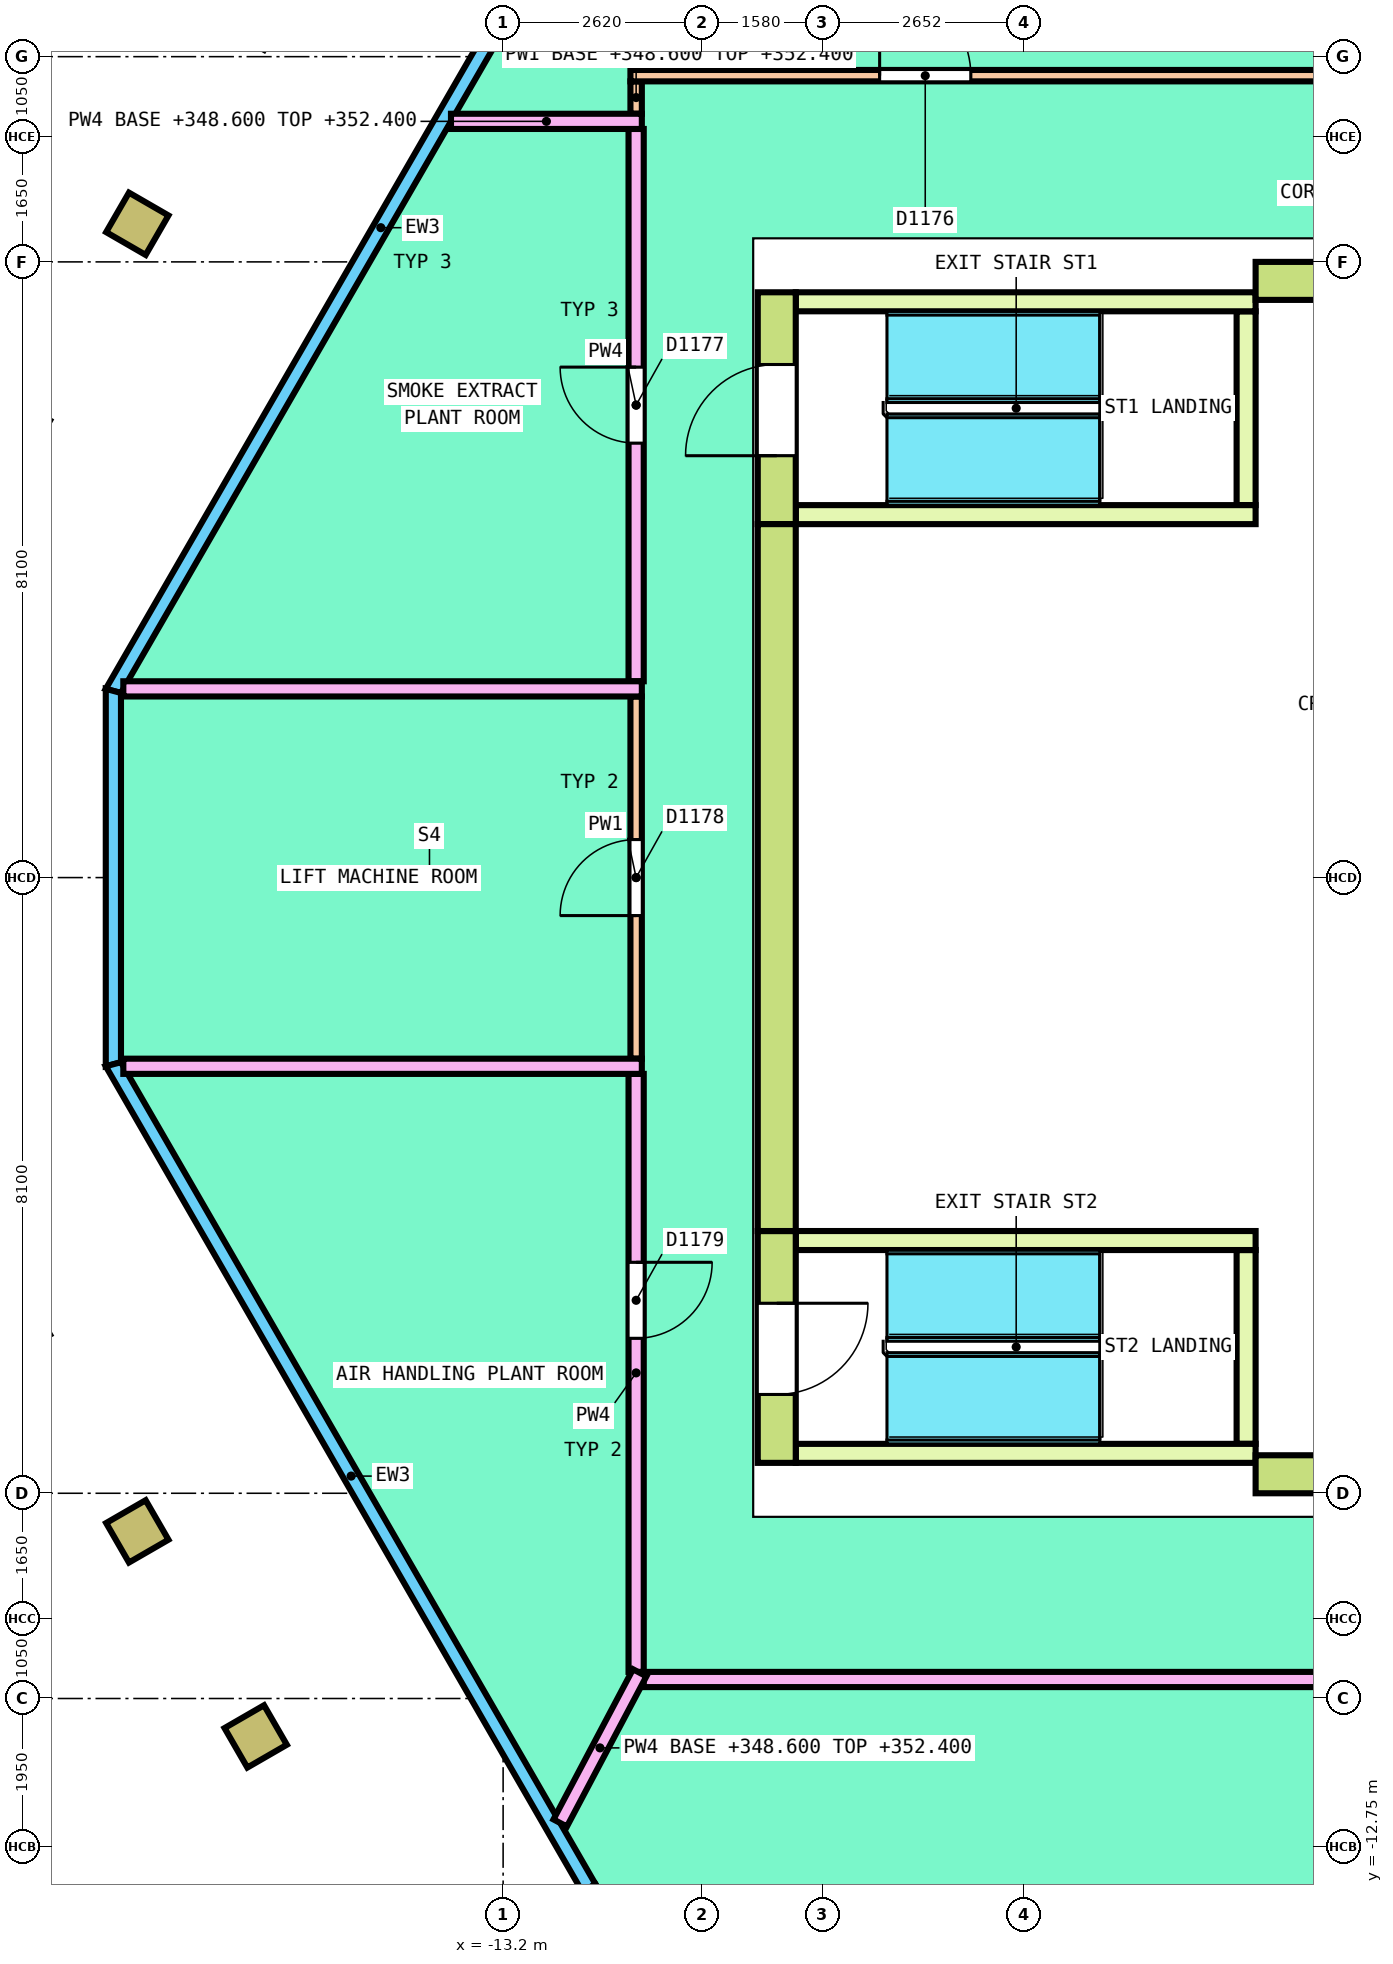
"""IFC4 building model, lengths in metres.
Left out: names, types, materials, properties, quantities, classifications, styles, units other than length and angle.
Written with IfcOpenShell. Run it as: python <this file> out.ifc"""

import sys

from ifc_helpers import new_model, si_unit, direction, frame, frame_2d, origin, origin_2d, place, context, subcontext, project, spatial, polyline, rectangle, hollow_rectangle, outline, extrude, element, fill, save


model = new_model("IFC4")
c1 = context("Model", 3, precision=1e-05, world=origin(), true_north=direction((0.0, 1.0)))
c2 = subcontext(c1, "Body", "Model", "MODEL_VIEW")
j1 = project(units=[si_unit("LENGTHUNIT", "METRE"), si_unit("PLANEANGLEUNIT", "RADIAN")], contexts=[c1])
p1 = place(None, origin())
s1 = spatial("IfcSite", under=j1, at=p1, CompositionType="ELEMENT")
p2 = place(p1, origin())
s2 = spatial("IfcBuilding", under=s1, at=p2, CompositionType="ELEMENT")
p3 = place(p2, frame((0.0, 0.0, 348.6)))
s3 = spatial("IfcBuildingStorey", under=s2, at=p3, CompositionType="ELEMENT", Elevation=348.6)
for number, where, z_axis, x_axis in (
    (1, (-18.013, 8.601, 0.0), (0.0, 0.0, 1.0), (-0.5, -0.866, 0.0)),
    (2, (-18.013, -8.601, 0.0), (0.0, 0.0, 1.0), (0.5, -0.866, 0.0)),
    (3, (-16.455, -11.299, 0.0), (0.0, 0.0, 1.0), (0.5, -0.866, 0.0)),
):
    element("IfcColumn", number, at=place(p3, frame(where, z_axis=z_axis, x_axis=x_axis)), inside=s3, PredefinedType="COLUMN", context=c2, shape_type="SweptSolid", body=[
        extrude(hollow_rectangle(XDim=0.6, YDim=0.6, WallThickness=0.04, InnerFilletRadius=0.04, OuterFilletRadius=0.08, at=origin_2d()), origin(), (0.0, 0.0, 1.0), 4.0),
    ])
p4 = place(p3, frame((-11.291, 14.644, 0.0), z_axis=(0.0, 0.0, 1.0), x_axis=(-0.499991740577, -0.866030172312, 0.0)))
e4 = element("IfcWall", 4, at=p4, inside=s3, PredefinedType="SOLIDWALL", context=c2, shape_type="SweptSolid", body=[
    extrude(outline(polyline([(-0.027, -0.1), (14.101, -0.1), (14.047, 0.1), (0.027, 0.1), (-0.027, -0.1)])), origin(), (0.0, 0.0, 1.0), 3.8),
])
p5 = place(p3, frame((-18.327, 2.456, 0.0), z_axis=(0.0, 0.0, 1.0), x_axis=(0.0, -1.0, 0.0)))
e5 = element("IfcWall", 5, at=p5, inside=s3, PredefinedType="SOLIDWALL", context=c2, shape_type="SweptSolid", body=[
    extrude(outline(polyline([(-0.027, -0.1), (4.938, -0.1), (4.885, 0.1), (0.027, 0.1), (-0.027, -0.1)])), origin(), (0.0, 0.0, 1.0), 3.8),
])
p6 = place(p3, frame((-18.327, -2.456, 0.0), z_axis=(0.0, 0.0, 1.0), x_axis=(0.499996062888, -0.866027676865, 0.0)))
e6 = element("IfcWall", 6, at=p6, inside=s3, PredefinedType="SOLIDWALL", context=c2, shape_type="SweptSolid", body=[
    extrude(outline(polyline([(-0.027, -0.1), (12.513, -0.1), (12.513, 0.1), (0.027, 0.1), (-0.027, -0.1)])), origin(), (0.0, 0.0, 1.0), 3.8),
])
p7 = place(p3, frame((-12.071, -13.292, 0.0), z_axis=(0.0, 0.0, 1.0), x_axis=(0.499957096737, -0.866050172578, 0.0)))
e7 = element("IfcWall", 7, at=p7, inside=s3, PredefinedType="SOLIDWALL", context=c2, shape_type="SweptSolid", body=[
    extrude(outline(polyline([(0.0, 0.0), (1.561, 0.0), (1.561, 1.457), (0.0, 4.0), (0.0, 0.0)])), frame((0.0, 0.1, 0.0), z_axis=(0.0, -1.0, 0.0), x_axis=(1.0, 0.0, 0.0)), (0.0, 0.0, 1.0), 0.2),
])
p8 = place(p3, frame((3.3, 7.85, 0.0), z_axis=(0.0, 0.0, 1.0), x_axis=(-1.0, 0.0, 0.0)))
e8 = element("IfcWall", 8, at=p8, inside=s3, PredefinedType="SHEAR", context=c2, shape_type="SweptSolid", body=[
    extrude(rectangle(XDim=6.6, YDim=0.5, at=frame_2d((3.3, 0.0))), origin(), (0.0, 0.0, 1.0), 3.8),
])
p9 = place(p3, frame((-9.6, 4.65, 0.0), z_axis=(0.0, 0.0, 1.0), x_axis=(0.0, -1.0, 0.0)))
e9 = element("IfcWall", 9, at=p9, inside=s3, PredefinedType="SHEAR", context=c2, shape_type="SweptSolid", body=[
    extrude(rectangle(XDim=9.3, YDim=0.5, at=frame_2d((4.65, 0.0))), origin(), (0.0, 0.0, 1.0), 3.8),
])
p10 = place(p3, frame((-3.3, -7.85, 0.0), z_axis=(0.0, 0.0, 1.0), x_axis=(1.0, 0.0, 0.0)))
e10 = element("IfcWall", 10, at=p10, inside=s3, PredefinedType="SHEAR", context=c2, shape_type="SweptSolid", body=[
    extrude(rectangle(XDim=12.9, YDim=0.5, at=frame_2d((6.45, 0.0))), origin(), (0.0, 0.0, 1.0), 3.8),
])
p11 = place(p10, frame((5.8, 0.0, 0.0)))
e11 = element("IfcOpeningElement", 11, at=p11, cuts=e10, PredefinedType="OPENING", context=c2, shape_type="SweptSolid", body=[
    extrude(rectangle(XDim=1.2, YDim=2.1, at=frame_2d((0.6, 1.05))), frame((0.0, 0.26, 0.0), z_axis=(0.0, -1.0, 0.0), x_axis=(1.0, 0.0, 0.0)), (0.0, 0.0, 1.0), 0.52),
])
p12 = place(p3, frame((-9.6, 4.65, 0.0), z_axis=(0.0, 0.0, 1.0), x_axis=(0.0, 1.0, 0.0)))
e12 = element("IfcWall", 12, at=p12, inside=s3, PredefinedType="SHEAR", context=c2, shape_type="SweptSolid", body=[
    extrude(rectangle(XDim=3.05, YDim=0.5, at=frame_2d((1.525, 0.0))), origin(), (0.0, 0.0, 1.0), 3.8),
])
p13 = place(p12, frame((0.9, 0.0, 0.0)))
e13 = element("IfcOpeningElement", 13, at=p13, cuts=e12, PredefinedType="OPENING", context=c2, shape_type="SweptSolid", body=[
    extrude(rectangle(XDim=1.2, YDim=2.1, at=frame_2d((0.6, 1.05))), frame((0.0, 0.26, 0.0), z_axis=(0.0, -1.0, 0.0), x_axis=(1.0, 0.0, 0.0)), (0.0, 0.0, 1.0), 0.52),
])
p14 = place(p3, frame((-3.425, 4.9, 0.0), z_axis=(0.0, 0.0, 1.0), x_axis=(0.0, 1.0, 0.0)))
e14 = element("IfcWall", 14, at=p14, inside=s3, PredefinedType="SOLIDWALL", context=c2, shape_type="SweptSolid", body=[
    extrude(rectangle(XDim=2.55, YDim=0.25, at=frame_2d((1.275, 0.0))), origin(), (0.0, 0.0, 1.0), 3.8),
])
for number, where, z_axis, x_axis in (
    (15, (-9.35, 4.775, 0.0), (0.0, 0.0, 1.0), (1.0, 0.0, 0.0)),
    (16, (-9.35, 7.575, 0.0), (0.0, 0.0, 1.0), (1.0, 0.0, 0.0)),
):
    element("IfcWall", number, at=place(p3, frame(where, z_axis=z_axis, x_axis=x_axis)), inside=s3, PredefinedType="SOLIDWALL", context=c2, shape_type="SweptSolid", body=[
        extrude(rectangle(XDim=6.05, YDim=0.25, at=frame_2d((3.025, 0.0))), origin(), (0.0, 0.0, 1.0), 3.8),
    ])
p15 = place(p3, frame((-9.6, -7.7, 0.0), z_axis=(0.0, 0.0, 1.0), x_axis=(0.0, 1.0, 0.0)))
e17 = element("IfcWall", 17, at=p15, inside=s3, PredefinedType="SHEAR", context=c2, shape_type="SweptSolid", body=[
    extrude(rectangle(XDim=3.05, YDim=0.5, at=frame_2d((1.525, 0.0))), origin(), (0.0, 0.0, 1.0), 3.8),
])
p16 = place(p15, frame((0.9, 0.0, 0.0)))
e18 = element("IfcOpeningElement", 18, at=p16, cuts=e17, PredefinedType="OPENING", context=c2, shape_type="SweptSolid", body=[
    extrude(rectangle(XDim=1.2, YDim=2.1, at=frame_2d((0.6, 1.05))), frame((0.0, 0.26, 0.0), z_axis=(0.0, -1.0, 0.0), x_axis=(1.0, 0.0, 0.0)), (0.0, 0.0, 1.0), 0.52),
])
p17 = place(p3, frame((-3.425, -7.45, 0.0), z_axis=(0.0, 0.0, 1.0), x_axis=(0.0, 1.0, 0.0)))
e19 = element("IfcWall", 19, at=p17, inside=s3, PredefinedType="SOLIDWALL", context=c2, shape_type="SweptSolid", body=[
    extrude(rectangle(XDim=2.55, YDim=0.25, at=frame_2d((1.275, 0.0))), origin(), (0.0, 0.0, 1.0), 3.8),
])
for number, where, z_axis, x_axis in (
    (20, (-9.35, -7.575, 0.0), (0.0, 0.0, 1.0), (1.0, 0.0, 0.0)),
    (21, (-9.35, -4.775, 0.0), (0.0, 0.0, 1.0), (1.0, 0.0, 0.0)),
):
    element("IfcWall", number, at=place(p3, frame(where, z_axis=z_axis, x_axis=x_axis)), inside=s3, PredefinedType="SOLIDWALL", context=c2, shape_type="SweptSolid", body=[
        extrude(rectangle(XDim=6.05, YDim=0.25, at=frame_2d((3.025, 0.0))), origin(), (0.0, 0.0, 1.0), 3.8),
    ])
p18 = place(p3, frame((-11.45, -2.383, 0.0), z_axis=(0.0, 0.0, 1.0), x_axis=(0.0, 1.0, 0.0)))
e22 = element("IfcWall", 22, at=p18, inside=s3, PredefinedType="PARTITIONING", context=c2, shape_type="SweptSolid", body=[
    extrude(rectangle(XDim=4.765, YDim=0.15, at=frame_2d((2.383, 0.0))), origin(), (0.0, 0.0, 1.0), 3.3),
])
p19 = place(p18, frame((1.883, 0.0, 0.0)))
e23 = element("IfcOpeningElement", 23, at=p19, cuts=e22, PredefinedType="OPENING", context=c2, shape_type="SweptSolid", body=[
    extrude(rectangle(XDim=1.0, YDim=2.1, at=frame_2d((0.5, 1.05))), frame((0.0, 0.085, 0.0), z_axis=(0.0, -1.0, 0.0), x_axis=(1.0, 0.0, 0.0)), (0.0, 0.0, 1.0), 0.17),
])
p20 = place(p3, frame((-11.45, 10.049, 0.0), z_axis=(0.0, 0.0, 1.0), x_axis=(0.0, 1.0, 0.0)))
e24 = element("IfcWall", 24, at=p20, inside=s3, PredefinedType="PARTITIONING", context=c2, shape_type="SweptSolid", body=[
    extrude(rectangle(XDim=0.426, YDim=0.15, at=frame_2d((0.213, 0.0))), origin(), (0.0, 0.0, 1.0), 3.8),
])
p21 = place(p3, frame((-11.525, 10.55, 0.0), z_axis=(0.0, 0.0, 1.0), x_axis=(1.0, 0.0, 0.0)))
e25 = element("IfcWall", 25, at=p21, inside=s3, PredefinedType="PARTITIONING", context=c2, shape_type="SweptSolid", body=[
    extrude(rectangle(XDim=9.867, YDim=0.15, at=frame_2d((4.934, 0.0))), origin(), (0.0, 0.0, 1.0), 3.3),
])
p22 = place(p21, frame((3.279, 0.0, 0.0)))
e26 = element("IfcOpeningElement", 26, at=p22, cuts=e25, PredefinedType="OPENING", context=c2, shape_type="SweptSolid", body=[
    extrude(rectangle(XDim=1.2, YDim=2.1, at=frame_2d((0.6, 1.05))), frame((0.0, 0.085, 0.0), z_axis=(0.0, -1.0, 0.0), x_axis=(1.0, 0.0, 0.0)), (0.0, 0.0, 1.0), 0.17),
])
p23 = place(p3, frame((-11.45, -10.45, 0.0), z_axis=(0.0, 0.0, 1.0), x_axis=(0.0, 1.0, 0.0)))
e27 = element("IfcWall", 27, at=p23, inside=s3, PredefinedType="PARTITIONING", context=c2, shape_type="SweptSolid", body=[
    extrude(rectangle(XDim=7.867, YDim=0.2, at=frame_2d((3.934, 0.0))), origin(), (0.0, 0.0, 1.0), 3.3),
])
p24 = place(p23, frame((4.389, 0.0, 0.0)))
e28 = element("IfcOpeningElement", 28, at=p24, cuts=e27, PredefinedType="OPENING", context=c2, shape_type="SweptSolid", body=[
    extrude(rectangle(XDim=1.0, YDim=2.1, at=frame_2d((0.5, 1.05))), frame((0.0, 0.11, 0.0), z_axis=(0.0, -1.0, 0.0), x_axis=(1.0, 0.0, 0.0)), (0.0, 0.0, 1.0), 0.22),
])
p25 = place(p3, frame((-11.45, 2.583, 0.0), z_axis=(0.0, 0.0, 1.0), x_axis=(0.0, 1.0, 0.0)))
e29 = element("IfcWall", 29, at=p25, inside=s3, PredefinedType="PARTITIONING", context=c2, shape_type="SweptSolid", body=[
    extrude(rectangle(XDim=7.266, YDim=0.2, at=frame_2d((3.633, 0.0))), origin(), (0.0, 0.0, 1.0), 3.3),
])
p26 = place(p25, frame((3.133, 0.0, 0.0)))
e30 = element("IfcOpeningElement", 30, at=p26, cuts=e29, PredefinedType="OPENING", context=c2, shape_type="SweptSolid", body=[
    extrude(rectangle(XDim=1.0, YDim=2.1, at=frame_2d((0.5, 1.05))), frame((0.0, 0.11, 0.0), z_axis=(0.0, -1.0, 0.0), x_axis=(1.0, 0.0, 0.0)), (0.0, 0.0, 1.0), 0.22),
])
p27 = place(p3, frame((-11.35, -10.55, 0.0), z_axis=(0.0, 0.0, 1.0), x_axis=(1.0, 0.0, 0.0)))
e31 = element("IfcWall", 31, at=p27, inside=s3, PredefinedType="PARTITIONING", context=c2, shape_type="SweptSolid", body=[
    extrude(rectangle(XDim=22.9, YDim=0.2, at=frame_2d((11.45, 0.0))), origin(), (0.0, 0.0, 1.0), 3.8),
])
p28 = place(p27, frame((10.75, 0.0, 0.0)))
e32 = element("IfcOpeningElement", 32, at=p28, cuts=e31, PredefinedType="OPENING", context=c2, shape_type="SweptSolid", body=[
    extrude(rectangle(XDim=1.2, YDim=2.1, at=frame_2d((0.6, 1.05))), frame((0.0, 0.11, 0.0), z_axis=(0.0, -1.0, 0.0), x_axis=(1.0, 0.0, 0.0)), (0.0, 0.0, 1.0), 0.22),
])
p29 = place(p3, frame((-18.197, -2.483, 0.0), z_axis=(0.0, 0.0, 1.0), x_axis=(1.0, 0.0, 0.0)))
e33 = element("IfcWall", 33, at=p29, inside=s3, PredefinedType="PARTITIONING", context=c2, shape_type="SweptSolid", body=[
    extrude(rectangle(XDim=6.822, YDim=0.2, at=frame_2d((3.411, 0.0))), origin(), (0.0, 0.0, 1.0), 3.3),
])
p30 = place(p3, frame((-13.886, 9.949, 0.0), z_axis=(0.0, 0.0, 1.0), x_axis=(1.0, 0.0, 0.0)))
e34 = element("IfcWall", 34, at=p30, inside=s3, PredefinedType="PARTITIONING", context=c2, shape_type="SweptSolid", body=[
    extrude(rectangle(XDim=2.511, YDim=0.2, at=frame_2d((1.255, 0.0))), origin(), (0.0, 0.0, 1.0), 3.8),
])
p31 = place(p3, frame((-18.197, 2.483, 0.0), z_axis=(0.0, 0.0, 1.0), x_axis=(1.0, 0.0, 0.0)))
e35 = element("IfcWall", 35, at=p31, inside=s3, PredefinedType="PARTITIONING", context=c2, shape_type="SweptSolid", body=[
    extrude(rectangle(XDim=6.822, YDim=0.2, at=frame_2d((3.411, 0.0))), origin(), (0.0, 0.0, 1.0), 3.3),
])
p32 = place(p3, frame((-12.449, -12.438, 0.0), z_axis=(0.0, 0.0, 1.0), x_axis=(0.467712102585, 0.883880868158, 0.0)))
e36 = element("IfcWall", 36, at=p32, inside=s3, PredefinedType="PARTITIONING", context=c2, shape_type="SweptSolid", body=[
    extrude(rectangle(XDim=2.236, YDim=0.2, at=frame_2d((1.118, 0.0))), origin(), (0.0, 0.0, 1.0), 3.8),
])
p33 = place(p13, origin())
e37 = element("IfcDoor", 37, at=p33, inside=s3, OperationType="SINGLE_SWING_RIGHT", PredefinedType="DOOR", context=c2, shape_type="SweptSolid", body=[
    extrude(rectangle(XDim=1.2, YDim=2.1, at=frame_2d((0.6, 1.05))), frame((0.0, 0.2, 0.0), z_axis=(0.0, -1.0, 0.0), x_axis=(1.0, 0.0, 0.0)), (0.0, 0.0, 1.0), 0.4),
])
fill(e13, e37)
p34 = place(p16, origin())
e38 = element("IfcDoor", 38, at=p34, inside=s3, OperationType="SINGLE_SWING_LEFT", PredefinedType="DOOR", context=c2, shape_type="SweptSolid", body=[
    extrude(rectangle(XDim=1.2, YDim=2.1, at=frame_2d((0.6, 1.05))), frame((0.0, 0.2, 0.0), z_axis=(0.0, -1.0, 0.0), x_axis=(1.0, 0.0, 0.0)), (0.0, 0.0, 1.0), 0.4),
])
fill(e18, e38)
p35 = place(p22, origin())
e39 = element("IfcDoor", 39, at=p35, inside=s3, OperationType="DOUBLE_DOOR_SINGLE_SWING", PredefinedType="DOOR", context=c2, shape_type="SweptSolid", body=[
    extrude(rectangle(XDim=1.2, YDim=2.1, at=frame_2d((0.6, 1.05))), frame((0.0, 0.025, 0.0), z_axis=(0.0, -1.0, 0.0), x_axis=(1.0, 0.0, 0.0)), (0.0, 0.0, 1.0), 0.05),
])
fill(e26, e39)
p36 = place(p26, origin())
e40 = element("IfcDoor", 40, at=p36, inside=s3, OperationType="SINGLE_SWING_RIGHT", PredefinedType="DOOR", context=c2, shape_type="SweptSolid", body=[
    extrude(rectangle(XDim=1.0, YDim=2.1, at=frame_2d((0.5, 1.05))), frame((0.0, 0.025, 0.0), z_axis=(0.0, -1.0, 0.0), x_axis=(1.0, 0.0, 0.0)), (0.0, 0.0, 1.0), 0.05),
])
fill(e30, e40)
p37 = place(p19, origin())
e41 = element("IfcDoor", 41, at=p37, inside=s3, OperationType="SINGLE_SWING_LEFT", PredefinedType="DOOR", context=c2, shape_type="SweptSolid", body=[
    extrude(rectangle(XDim=1.0, YDim=2.1, at=frame_2d((0.5, 1.05))), frame((0.0, 0.025, 0.0), z_axis=(0.0, -1.0, 0.0), x_axis=(1.0, 0.0, 0.0)), (0.0, 0.0, 1.0), 0.05),
])
fill(e23, e41)
p38 = place(p24, origin())
e42 = element("IfcDoor", 42, at=p38, inside=s3, OperationType="SINGLE_SWING_RIGHT", PredefinedType="DOOR", context=c2, shape_type="SweptSolid", body=[
    extrude(rectangle(XDim=1.0, YDim=2.1, at=frame_2d((0.5, 1.05))), frame((0.0, 0.025, 0.0), z_axis=(0.0, -1.0, 0.0), x_axis=(1.0, 0.0, 0.0)), (0.0, 0.0, 1.0), 0.05),
])
fill(e28, e42)
save(model, sys.argv[1])
